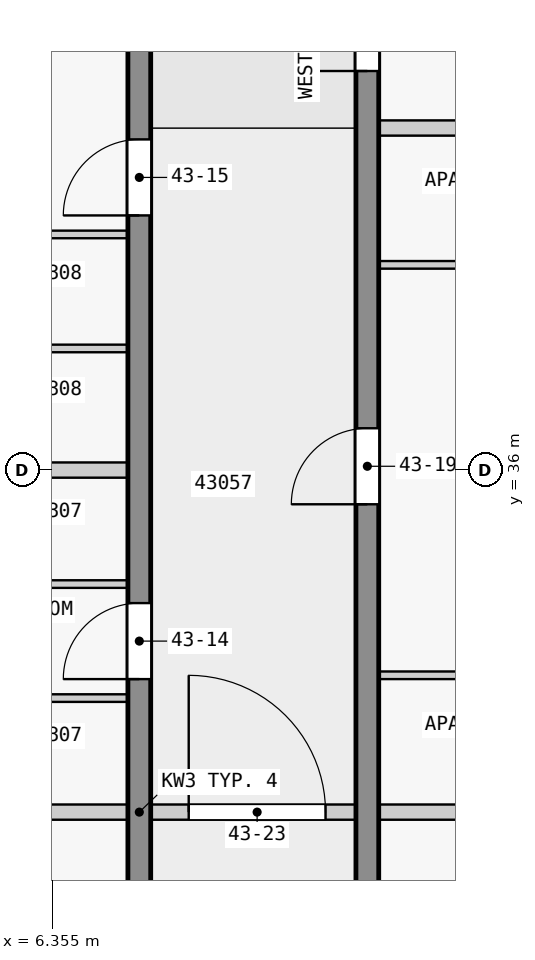
"""IFC4 building model, lengths in metres.
Left out: names, types, materials, properties, quantities, classifications, styles, units other than length and angle.
Written with IfcOpenShell. Run it as: python <this file> out.ifc"""

import sys

from ifc_helpers import new_model, si_unit, direction, frame, frame_2d, origin, place, context, subcontext, project, spatial, rectangle, extrude, element, fill, save


model = new_model("IFC4")
c1 = context("Model", 3, precision=1e-05, world=origin(), true_north=direction((0.0, 1.0)))
c2 = subcontext(c1, "Body", "Model", "MODEL_VIEW")
j1 = project(units=[si_unit("LENGTHUNIT", "METRE"), si_unit("PLANEANGLEUNIT", "RADIAN")], contexts=[c1])
p1 = place(None, origin())
s1 = spatial("IfcSite", under=j1, at=p1, CompositionType="ELEMENT")
p2 = place(p1, origin())
s2 = spatial("IfcBuilding", under=s1, at=p2, CompositionType="ELEMENT")
p3 = place(p2, frame((0.0, 0.0, 167.4)))
s3 = spatial("IfcBuildingStorey", under=s2, at=p3, CompositionType="ELEMENT", Elevation=167.4)
p4 = place(p3, frame((7.5, 18.0, 0.0), z_axis=(0.0, 0.0, 1.0), x_axis=(0.0, 1.0, 0.0)))
e1 = element("IfcWall", 1, at=p4, inside=s3, PredefinedType="SHEAR", context=c2, shape_type="SweptSolid", body=[
    extrude(rectangle(XDim=27.0, YDim=0.3, at=frame_2d((13.5, 0.0))), origin(), (0.0, 0.0, 1.0), 3.25),
])
p5 = place(p4, frame((1.75, 0.0, 0.0)))
e2 = element("IfcOpeningElement", 2, at=p5, cuts=e1, PredefinedType="OPENING", context=c2, shape_type="SweptSolid", body=[
    extrude(rectangle(XDim=1.0, YDim=2.1, at=frame_2d((0.5, 1.05))), frame((0.0, 0.16, 0.0), z_axis=(0.0, -1.0, 0.0), x_axis=(1.0, 0.0, 0.0)), (0.0, 0.0, 1.0), 0.32),
])
p6 = place(p4, frame((6.25, 0.0, 0.0)))
e3 = element("IfcOpeningElement", 3, at=p6, cuts=e1, PredefinedType="OPENING", context=c2, shape_type="SweptSolid", body=[
    extrude(rectangle(XDim=1.0, YDim=2.1, at=frame_2d((0.5, 1.05))), frame((0.0, 0.16, 0.0), z_axis=(0.0, -1.0, 0.0), x_axis=(1.0, 0.0, 0.0)), (0.0, 0.0, 1.0), 0.32),
])
p7 = place(p4, frame((10.75, 0.0, 0.0)))
e4 = element("IfcOpeningElement", 4, at=p7, cuts=e1, PredefinedType="OPENING", context=c2, shape_type="SweptSolid", body=[
    extrude(rectangle(XDim=1.0, YDim=2.1, at=frame_2d((0.5, 1.05))), frame((0.0, 0.16, 0.0), z_axis=(0.0, -1.0, 0.0), x_axis=(1.0, 0.0, 0.0)), (0.0, 0.0, 1.0), 0.32),
])
p8 = place(p4, frame((15.25, 0.0, 0.0)))
e5 = element("IfcOpeningElement", 5, at=p8, cuts=e1, PredefinedType="OPENING", context=c2, shape_type="SweptSolid", body=[
    extrude(rectangle(XDim=1.0, YDim=2.1, at=frame_2d((0.5, 1.05))), frame((0.0, 0.16, 0.0), z_axis=(0.0, -1.0, 0.0), x_axis=(1.0, 0.0, 0.0)), (0.0, 0.0, 1.0), 0.32),
])
p9 = place(p4, frame((21.35, 0.0, 0.0)))
e6 = element("IfcOpeningElement", 6, at=p9, cuts=e1, PredefinedType="OPENING", context=c2, shape_type="SweptSolid", body=[
    extrude(rectangle(XDim=1.0, YDim=2.1, at=frame_2d((0.5, 1.05))), frame((0.0, 0.16, 0.0), z_axis=(0.0, -1.0, 0.0), x_axis=(1.0, 0.0, 0.0)), (0.0, 0.0, 1.0), 0.32),
])
p10 = place(p3, frame((10.5, 18.0, 0.0), z_axis=(0.0, 0.0, 1.0), x_axis=(0.0, 1.0, 0.0)))
e7 = element("IfcWall", 7, at=p10, inside=s3, PredefinedType="SHEAR", context=c2, shape_type="SweptSolid", body=[
    extrude(rectangle(XDim=27.0, YDim=0.3, at=frame_2d((13.5, 0.0))), origin(), (0.0, 0.0, 1.0), 3.25),
])
p11 = place(p10, frame((1.75, 0.0, 0.0)))
e8 = element("IfcOpeningElement", 8, at=p11, cuts=e7, PredefinedType="OPENING", context=c2, shape_type="SweptSolid", body=[
    extrude(rectangle(XDim=1.0, YDim=2.1, at=frame_2d((0.5, 1.05))), frame((0.0, 0.16, 0.0), z_axis=(0.0, -1.0, 0.0), x_axis=(1.0, 0.0, 0.0)), (0.0, 0.0, 1.0), 0.32),
])
p12 = place(p10, frame((6.25, 0.0, 0.0)))
e9 = element("IfcOpeningElement", 9, at=p12, cuts=e7, PredefinedType="OPENING", context=c2, shape_type="SweptSolid", body=[
    extrude(rectangle(XDim=1.0, YDim=2.1, at=frame_2d((0.5, 1.05))), frame((0.0, 0.16, 0.0), z_axis=(0.0, -1.0, 0.0), x_axis=(1.0, 0.0, 0.0)), (0.0, 0.0, 1.0), 0.32),
])
p13 = place(p10, frame((10.35, 0.0, 0.0)))
e10 = element("IfcOpeningElement", 10, at=p13, cuts=e7, PredefinedType="OPENING", context=c2, shape_type="SweptSolid", body=[
    extrude(rectangle(XDim=1.8, YDim=2.1, at=frame_2d((0.9, 1.05))), frame((0.0, 0.16, 0.0), z_axis=(0.0, -1.0, 0.0), x_axis=(1.0, 0.0, 0.0)), (0.0, 0.0, 1.0), 0.32),
])
p14 = place(p10, frame((17.55, 0.0, 0.0)))
e11 = element("IfcOpeningElement", 11, at=p14, cuts=e7, PredefinedType="OPENING", context=c2, shape_type="SweptSolid", body=[
    extrude(rectangle(XDim=1.0, YDim=2.1, at=frame_2d((0.5, 1.05))), frame((0.0, 0.16, 0.0), z_axis=(0.0, -1.0, 0.0), x_axis=(1.0, 0.0, 0.0)), (0.0, 0.0, 1.0), 0.32),
])
p15 = place(p10, frame((23.25, 0.0, 0.0)))
e12 = element("IfcOpeningElement", 12, at=p15, cuts=e7, PredefinedType="OPENING", context=c2, shape_type="SweptSolid", body=[
    extrude(rectangle(XDim=0.9, YDim=2.1, at=frame_2d((0.45, 1.05))), frame((0.0, 0.16, 0.0), z_axis=(0.0, -1.0, 0.0), x_axis=(1.0, 0.0, 0.0)), (0.0, 0.0, 1.0), 0.32),
])
p16 = place(p10, frame((25.45, 0.0, 0.0)))
e13 = element("IfcOpeningElement", 13, at=p16, cuts=e7, PredefinedType="OPENING", context=c2, shape_type="SweptSolid", body=[
    extrude(rectangle(XDim=1.0, YDim=2.1, at=frame_2d((0.5, 1.05))), frame((0.0, 0.16, 0.0), z_axis=(0.0, -1.0, 0.0), x_axis=(1.0, 0.0, 0.0)), (0.0, 0.0, 1.0), 0.32),
])
for number, where, z_axis, x_axis in (
    (14, (7.35, 31.5, 0.0), (0.0, 0.0, 1.0), (-1.0, 0.0, 0.0)),
    (15, (17.85, 31.5, 0.0), (0.0, 0.0, 1.0), (-1.0, 0.0, 0.0)),
):
    element("IfcWall", number, at=place(p3, frame(where, z_axis=z_axis, x_axis=x_axis)), inside=s3, PredefinedType="PARTITIONING", context=c2, shape_type="SweptSolid", body=[
        extrude(rectangle(XDim=7.2, YDim=0.2, at=frame_2d((3.6, 0.0))), origin(), (0.0, 0.0, 1.0), 3.25),
    ])
p17 = place(p3, frame((7.35, 33.0, 0.0), z_axis=(0.0, 0.0, 1.0), x_axis=(-1.0, 0.0, 0.0)))
e16 = element("IfcWall", 16, at=p17, inside=s3, PredefinedType="PARTITIONING", context=c2, shape_type="SweptSolid", body=[
    extrude(rectangle(XDim=3.4, YDim=0.1, at=frame_2d((1.7, 0.0))), origin(), (0.0, 0.0, 1.0), 3.25),
])
p18 = place(p17, frame((1.25, 0.0, 0.0)))
e17 = element("IfcOpeningElement", 17, at=p18, cuts=e16, PredefinedType="OPENING", context=c2, shape_type="SweptSolid", body=[
    extrude(rectangle(XDim=0.9, YDim=2.1, at=frame_2d((0.45, 1.05))), frame((0.0, 0.06, 0.0), z_axis=(0.0, -1.0, 0.0), x_axis=(1.0, 0.0, 0.0)), (0.0, 0.0, 1.0), 0.12),
])
p19 = place(p3, frame((14.05, 33.3, 0.0), z_axis=(0.0, 0.0, 1.0), x_axis=(-1.0, 0.0, 0.0)))
e18 = element("IfcWall", 18, at=p19, inside=s3, PredefinedType="PARTITIONING", context=c2, shape_type="SweptSolid", body=[
    extrude(rectangle(XDim=3.4, YDim=0.1, at=frame_2d((1.7, 0.0))), origin(), (0.0, 0.0, 1.0), 3.25),
])
p20 = place(p19, frame((1.25, 0.0, 0.0)))
e19 = element("IfcOpeningElement", 19, at=p20, cuts=e18, PredefinedType="OPENING", context=c2, shape_type="SweptSolid", body=[
    extrude(rectangle(XDim=0.9, YDim=2.1, at=frame_2d((0.45, 1.05))), frame((0.0, 0.06, 0.0), z_axis=(0.0, -1.0, 0.0), x_axis=(1.0, 0.0, 0.0)), (0.0, 0.0, 1.0), 0.12),
])
p21 = place(p3, frame((4.0, 34.5, 0.0), z_axis=(0.0, 0.0, 1.0), x_axis=(1.0, 0.0, 0.0)))
e20 = element("IfcWall", 20, at=p21, inside=s3, PredefinedType="PARTITIONING", context=c2, shape_type="SweptSolid", body=[
    extrude(rectangle(XDim=3.35, YDim=0.1, at=frame_2d((1.675, 0.0))), origin(), (0.0, 0.0, 1.0), 3.25),
])
p22 = place(p21, frame((1.25, 0.0, 0.0)))
e21 = element("IfcOpeningElement", 21, at=p22, cuts=e20, PredefinedType="OPENING", context=c2, shape_type="SweptSolid", body=[
    extrude(rectangle(XDim=0.9, YDim=2.1, at=frame_2d((0.45, 1.05))), frame((0.0, 0.06, 0.0), z_axis=(0.0, -1.0, 0.0), x_axis=(1.0, 0.0, 0.0)), (0.0, 0.0, 1.0), 0.12),
])
p23 = place(p3, frame((7.35, 36.0, 0.0), z_axis=(0.0, 0.0, 1.0), x_axis=(-1.0, 0.0, 0.0)))
e22 = element("IfcWall", 22, at=p23, inside=s3, PredefinedType="PARTITIONING", context=c2, shape_type="SweptSolid", body=[
    extrude(rectangle(XDim=3.4, YDim=0.2, at=frame_2d((1.7, 0.0))), origin(), (0.0, 0.0, 1.0), 3.25),
])
p24 = place(p3, frame((7.35, 37.6, 0.0), z_axis=(0.0, 0.0, 1.0), x_axis=(-1.0, 0.0, 0.0)))
e23 = element("IfcWall", 23, at=p24, inside=s3, PredefinedType="PARTITIONING", context=c2, shape_type="SweptSolid", body=[
    extrude(rectangle(XDim=3.35, YDim=0.1, at=frame_2d((1.675, 0.0))), origin(), (0.0, 0.0, 1.0), 3.25),
])
p25 = place(p3, frame((10.65, 38.7, 0.0), z_axis=(0.0, 0.0, 1.0), x_axis=(1.0, 0.0, 0.0)))
e24 = element("IfcWall", 24, at=p25, inside=s3, PredefinedType="PARTITIONING", context=c2, shape_type="SweptSolid", body=[
    extrude(rectangle(XDim=3.4, YDim=0.1, at=frame_2d((1.7, 0.0))), origin(), (0.0, 0.0, 1.0), 3.25),
])
p26 = place(p25, frame((1.25, 0.0, 0.0)))
e25 = element("IfcOpeningElement", 25, at=p26, cuts=e24, PredefinedType="OPENING", context=c2, shape_type="SweptSolid", body=[
    extrude(rectangle(XDim=0.9, YDim=2.1, at=frame_2d((0.45, 1.05))), frame((0.0, 0.06, 0.0), z_axis=(0.0, -1.0, 0.0), x_axis=(1.0, 0.0, 0.0)), (0.0, 0.0, 1.0), 0.12),
])
p27 = place(p3, frame((7.35, 39.1, 0.0), z_axis=(0.0, 0.0, 1.0), x_axis=(-1.0, 0.0, 0.0)))
e26 = element("IfcWall", 26, at=p27, inside=s3, PredefinedType="PARTITIONING", context=c2, shape_type="SweptSolid", body=[
    extrude(rectangle(XDim=3.35, YDim=0.1, at=frame_2d((1.675, 0.0))), origin(), (0.0, 0.0, 1.0), 3.25),
])
p28 = place(p27, frame((1.25, 0.0, 0.0)))
e27 = element("IfcOpeningElement", 27, at=p28, cuts=e26, PredefinedType="OPENING", context=c2, shape_type="SweptSolid", body=[
    extrude(rectangle(XDim=0.9, YDim=2.1, at=frame_2d((0.45, 1.05))), frame((0.0, 0.06, 0.0), z_axis=(0.0, -1.0, 0.0), x_axis=(1.0, 0.0, 0.0)), (0.0, 0.0, 1.0), 0.12),
])
p29 = place(p3, frame((18.08, 40.5, 0.0), z_axis=(0.0, 0.0, 1.0), x_axis=(-1.0, 0.0, 0.0)))
e28 = element("IfcWall", 28, at=p29, inside=s3, PredefinedType="PARTITIONING", context=c2, shape_type="SweptSolid", body=[
    extrude(rectangle(XDim=7.43, YDim=0.2, at=frame_2d((3.715, 0.0))), origin(), (0.0, 0.0, 1.0), 3.25),
])
p30 = place(p3, frame((7.45, 31.5, 0.0), z_axis=(0.0, 0.0, 1.0), x_axis=(1.0, 0.0, 0.0)))
e29 = element("IfcWall", 29, at=p30, inside=s3, PredefinedType="PARTITIONING", context=c2, shape_type="SweptSolid", body=[
    extrude(rectangle(XDim=3.1, YDim=0.2, at=frame_2d((1.55, 0.0))), origin(), (0.0, 0.0, 1.0), 3.25),
])
p31 = place(p30, frame((0.7, 0.0, 0.0)))
e30 = element("IfcOpeningElement", 30, at=p31, cuts=e29, PredefinedType="OPENING", context=c2, shape_type="SweptSolid", body=[
    extrude(rectangle(XDim=1.8, YDim=2.1, at=frame_2d((0.9, 1.05))), frame((0.0, 0.11, 0.0), z_axis=(0.0, -1.0, 0.0), x_axis=(1.0, 0.0, 0.0)), (0.0, 0.0, 1.0), 0.22),
])
p32 = place(p8, origin())
e31 = element("IfcDoor", 31, at=p32, inside=s3, OperationType="SINGLE_SWING_RIGHT", PredefinedType="DOOR", context=c2, shape_type="SweptSolid", body=[
    extrude(rectangle(XDim=1.0, YDim=2.1, at=frame_2d((0.5, 1.05))), frame((0.0, 0.025, 0.0), z_axis=(0.0, -1.0, 0.0), x_axis=(1.0, 0.0, 0.0)), (0.0, 0.0, 1.0), 0.05),
])
fill(e5, e31)
p33 = place(p9, origin())
e32 = element("IfcDoor", 32, at=p33, inside=s3, OperationType="SINGLE_SWING_RIGHT", PredefinedType="DOOR", context=c2, shape_type="SweptSolid", body=[
    extrude(rectangle(XDim=1.0, YDim=2.1, at=frame_2d((0.5, 1.05))), frame((0.0, 0.025, 0.0), z_axis=(0.0, -1.0, 0.0), x_axis=(1.0, 0.0, 0.0)), (0.0, 0.0, 1.0), 0.05),
])
fill(e6, e32)
p34 = place(p14, origin())
e33 = element("IfcDoor", 33, at=p34, inside=s3, OperationType="SINGLE_SWING_RIGHT", PredefinedType="DOOR", context=c2, shape_type="SweptSolid", body=[
    extrude(rectangle(XDim=1.0, YDim=2.1, at=frame_2d((0.5, 1.05))), frame((0.0, 0.025, 0.0), z_axis=(0.0, -1.0, 0.0), x_axis=(1.0, 0.0, 0.0)), (0.0, 0.0, 1.0), 0.05),
])
fill(e11, e33)
p35 = place(p15, origin())
e34 = element("IfcDoor", 34, at=p35, inside=s3, OperationType="SINGLE_SWING_RIGHT", PredefinedType="DOOR", context=c2, shape_type="SweptSolid", body=[
    extrude(rectangle(XDim=0.9, YDim=2.1, at=frame_2d((0.45, 1.05))), frame((0.0, 0.025, 0.0), z_axis=(0.0, -1.0, 0.0), x_axis=(1.0, 0.0, 0.0)), (0.0, 0.0, 1.0), 0.05),
])
fill(e12, e34)
p36 = place(p31, origin())
e35 = element("IfcDoor", 35, at=p36, inside=s3, OperationType="SINGLE_SWING_RIGHT", PredefinedType="DOOR", context=c2, shape_type="SweptSolid", body=[
    extrude(rectangle(XDim=1.8, YDim=2.1, at=frame_2d((0.9, 1.05))), frame((0.0, 0.025, 0.0), z_axis=(0.0, -1.0, 0.0), x_axis=(1.0, 0.0, 0.0)), (0.0, 0.0, 1.0), 0.05),
])
fill(e30, e35)
save(model, sys.argv[1])
